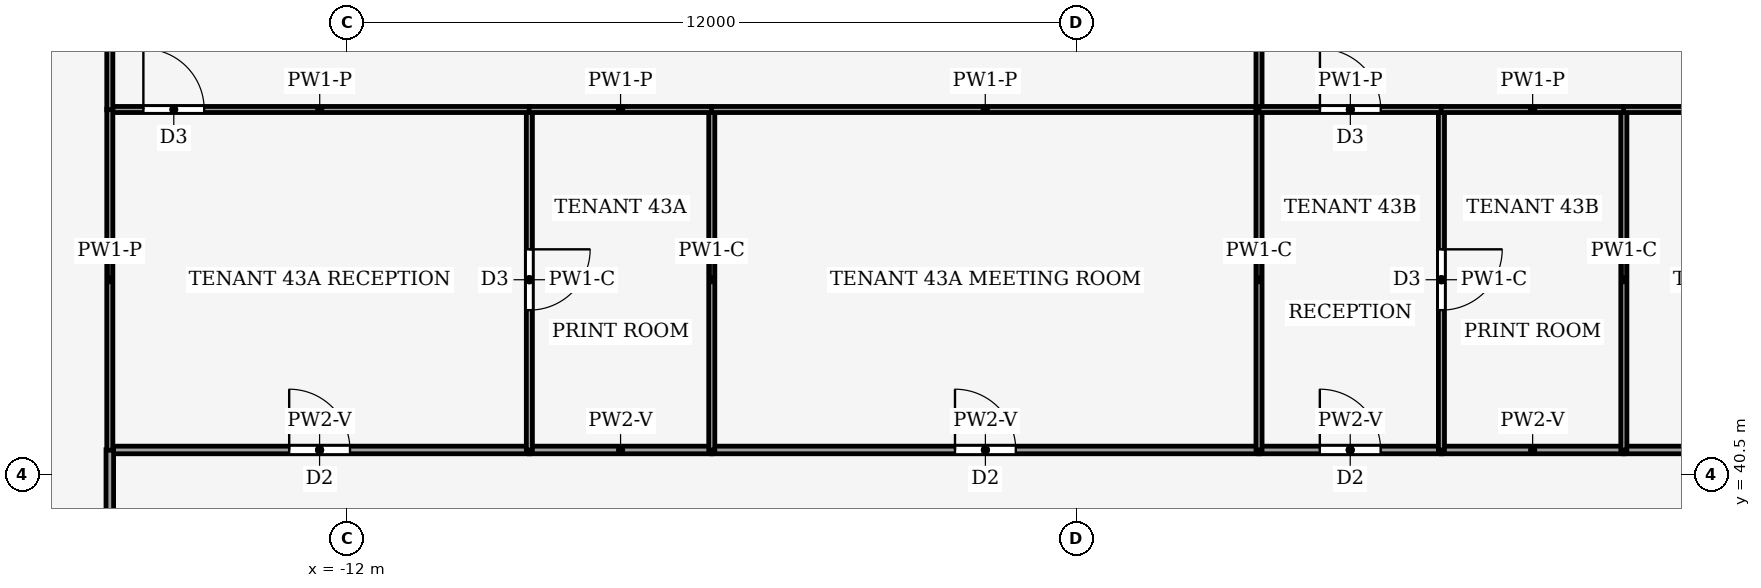
"""IFC4 building model, lengths in metres.
Left out: names, types, materials, properties, quantities, classifications, styles, units other than length and angle.
Written with IfcOpenShell. Run it as: python <this file> out.ifc"""

import sys

from ifc_helpers import new_model, si_unit, direction, frame, frame_2d, origin, place, context, subcontext, project, spatial, rectangle, extrude, element, fill, save


model = new_model("IFC4")
c1 = context("Model", 3, precision=1e-05, world=origin(), true_north=direction((0.0, 1.0)))
c2 = subcontext(c1, "Body", "Model", "MODEL_VIEW")
j1 = project(units=[si_unit("LENGTHUNIT", "METRE"), si_unit("PLANEANGLEUNIT", "RADIAN")], contexts=[c1])
p1 = place(None, origin())
s1 = spatial("IfcSite", under=j1, at=p1, CompositionType="ELEMENT")
p2 = place(p1, origin())
s2 = spatial("IfcBuilding", under=s1, at=p2, CompositionType="ELEMENT")
p3 = place(p2, frame((0.0, 0.0, 190.0)))
s3 = spatial("IfcBuildingStorey", under=s2, at=p3, CompositionType="ELEMENT", Elevation=190.0)
p4 = place(p3, frame((-15.9, 40.9, 0.0), z_axis=(0.0, 0.0, 1.0), x_axis=(1.0, 0.0, 0.0)))
e1 = element("IfcWall", 1, at=p4, inside=s3, PredefinedType="PARTITIONING", context=c2, shape_type="SweptSolid", body=[
    extrude(rectangle(XDim=6.9, YDim=0.125, at=frame_2d((3.45, 0.0))), origin(), (0.0, 0.0, 1.0), 3.44),
])
p5 = place(p4, frame((2.95, 0.0, 0.0)))
e2 = element("IfcOpeningElement", 2, at=p5, cuts=e1, PredefinedType="OPENING", context=c2, shape_type="SweptSolid", body=[
    extrude(rectangle(XDim=1.0, YDim=2.1, at=frame_2d((0.5, 1.05))), frame((0.0, 0.073, 0.0), z_axis=(0.0, -1.0, 0.0), x_axis=(1.0, 0.0, 0.0)), (0.0, 0.0, 1.0), 0.145),
])
p6 = place(p3, frame((-6.0, 40.9, 0.0), z_axis=(0.0, 0.0, 1.0), x_axis=(-1.0, 0.0, 0.0)))
e3 = element("IfcWall", 3, at=p6, inside=s3, PredefinedType="PARTITIONING", context=c2, shape_type="SweptSolid", body=[
    extrude(rectangle(XDim=3.0, YDim=0.125, at=frame_2d((1.5, 0.0))), origin(), (0.0, 0.0, 1.0), 3.44),
])
p7 = place(p3, frame((-6.0, 40.9, 0.0), z_axis=(0.0, 0.0, 1.0), x_axis=(1.0, 0.0, 0.0)))
e4 = element("IfcWall", 4, at=p7, inside=s3, PredefinedType="PARTITIONING", context=c2, shape_type="SweptSolid", body=[
    extrude(rectangle(XDim=9.0, YDim=0.125, at=frame_2d((4.5, 0.0))), origin(), (0.0, 0.0, 1.0), 3.44),
])
p8 = place(p7, frame((4.0, 0.0, 0.0)))
e5 = element("IfcOpeningElement", 5, at=p8, cuts=e4, PredefinedType="OPENING", context=c2, shape_type="SweptSolid", body=[
    extrude(rectangle(XDim=1.0, YDim=2.1, at=frame_2d((0.5, 1.05))), frame((0.0, 0.073, 0.0), z_axis=(0.0, -1.0, 0.0), x_axis=(1.0, 0.0, 0.0)), (0.0, 0.0, 1.0), 0.145),
])
p9 = place(p3, frame((3.0, 40.9, 0.0), z_axis=(0.0, 0.0, 1.0), x_axis=(1.0, 0.0, 0.0)))
e6 = element("IfcWall", 6, at=p9, inside=s3, PredefinedType="PARTITIONING", context=c2, shape_type="SweptSolid", body=[
    extrude(rectangle(XDim=3.0, YDim=0.125, at=frame_2d((1.5, 0.0))), origin(), (0.0, 0.0, 1.0), 3.44),
])
p10 = place(p9, frame((1.0, 0.0, 0.0)))
e7 = element("IfcOpeningElement", 7, at=p10, cuts=e6, PredefinedType="OPENING", context=c2, shape_type="SweptSolid", body=[
    extrude(rectangle(XDim=1.0, YDim=2.1, at=frame_2d((0.5, 1.05))), frame((0.0, 0.073, 0.0), z_axis=(0.0, -1.0, 0.0), x_axis=(1.0, 0.0, 0.0)), (0.0, 0.0, 1.0), 0.145),
])
p11 = place(p3, frame((9.0, 40.9, 0.0), z_axis=(0.0, 0.0, 1.0), x_axis=(-1.0, 0.0, 0.0)))
e8 = element("IfcWall", 8, at=p11, inside=s3, PredefinedType="PARTITIONING", context=c2, shape_type="SweptSolid", body=[
    extrude(rectangle(XDim=3.0, YDim=0.125, at=frame_2d((1.5, 0.0))), origin(), (0.0, 0.0, 1.0), 3.44),
])
p12 = place(p3, frame((9.0, 40.9, 0.0), z_axis=(0.0, 0.0, 1.0), x_axis=(1.0, 0.0, 0.0)))
e9 = element("IfcWall", 9, at=p12, inside=s3, PredefinedType="PARTITIONING", context=c2, shape_type="SweptSolid", body=[
    extrude(rectangle(XDim=6.9, YDim=0.125, at=frame_2d((3.45, 0.0))), origin(), (0.0, 0.0, 1.0), 3.44),
])
p13 = place(p12, frame((2.95, 0.0, 0.0)))
e10 = element("IfcOpeningElement", 10, at=p13, cuts=e9, PredefinedType="OPENING", context=c2, shape_type="SweptSolid", body=[
    extrude(rectangle(XDim=1.0, YDim=2.1, at=frame_2d((0.5, 1.05))), frame((0.0, 0.073, 0.0), z_axis=(0.0, -1.0, 0.0), x_axis=(1.0, 0.0, 0.0)), (0.0, 0.0, 1.0), 0.145),
])
p14 = place(p3, frame((-15.9, 34.5, 0.0), z_axis=(0.0, 0.0, 1.0), x_axis=(0.0, 1.0, 0.0)))
e11 = element("IfcWall", 11, at=p14, inside=s3, PredefinedType="PARTITIONING", context=c2, shape_type="SweptSolid", body=[
    extrude(rectangle(XDim=6.404, YDim=0.125, at=frame_2d((3.202, 0.0))), origin(), (0.0, 0.0, 1.0), 3.14),
])
p15 = place(p14, frame((2.702, 0.0, 0.0)))
e12 = element("IfcOpeningElement", 12, at=p15, cuts=e11, PredefinedType="OPENING", context=c2, shape_type="SweptSolid", body=[
    extrude(rectangle(XDim=1.0, YDim=2.1, at=frame_2d((0.5, 1.05))), frame((0.0, 0.073, 0.0), z_axis=(0.0, -1.0, 0.0), x_axis=(1.0, 0.0, 0.0)), (0.0, 0.0, 1.0), 0.145),
])
p16 = place(p3, frame((-9.0, 46.5, 0.0), z_axis=(0.0, 0.0, 1.0), x_axis=(0.0, -1.0, 0.0)))
e13 = element("IfcWall", 13, at=p16, inside=s3, PredefinedType="PARTITIONING", context=c2, shape_type="SweptSolid", body=[
    extrude(rectangle(XDim=5.6, YDim=0.1, at=frame_2d((2.8, 0.0))), origin(), (0.0, 0.0, 1.0), 3.87),
])
p17 = place(p16, frame((2.3, 0.0, 0.0)))
e14 = element("IfcOpeningElement", 14, at=p17, cuts=e13, PredefinedType="OPENING", context=c2, shape_type="SweptSolid", body=[
    extrude(rectangle(XDim=1.0, YDim=2.1, at=frame_2d((0.5, 1.05))), frame((0.0, 0.06, 0.0), z_axis=(0.0, -1.0, 0.0), x_axis=(1.0, 0.0, 0.0)), (0.0, 0.0, 1.0), 0.12),
])
p18 = place(p3, frame((-15.9, 46.5, 0.0), z_axis=(0.0, 0.0, 1.0), x_axis=(1.0, 0.0, 0.0)))
e15 = element("IfcWall", 15, at=p18, inside=s3, PredefinedType="PARTITIONING", context=c2, shape_type="SweptSolid", body=[
    extrude(rectangle(XDim=6.904, YDim=0.1, at=frame_2d((3.452, 0.0))), origin(), (0.0, 0.0, 1.0), 3.44),
])
p19 = place(p18, frame((0.552, 0.0, 0.0)))
e16 = element("IfcOpeningElement", 16, at=p19, cuts=e15, PredefinedType="OPENING", context=c2, shape_type="SweptSolid", body=[
    extrude(rectangle(XDim=1.0, YDim=2.1, at=frame_2d((0.5, 1.05))), frame((0.0, 0.06, 0.0), z_axis=(0.0, -1.0, 0.0), x_axis=(1.0, 0.0, 0.0)), (0.0, 0.0, 1.0), 0.12),
])
p20 = place(p3, frame((-15.9, 46.504, 0.0), z_axis=(0.0, 0.0, 1.0), x_axis=(0.0, -1.0, 0.0)))
e17 = element("IfcWall", 17, at=p20, inside=s3, PredefinedType="PARTITIONING", context=c2, shape_type="SweptSolid", body=[
    extrude(rectangle(XDim=5.608, YDim=0.1, at=frame_2d((2.804, 0.0))), origin(), (0.0, 0.0, 1.0), 3.44),
])
p21 = place(p3, frame((-6.0, 40.9, 0.0), z_axis=(0.0, 0.0, 1.0), x_axis=(0.0, 1.0, 0.0)))
e18 = element("IfcWall", 18, at=p21, inside=s3, PredefinedType="PARTITIONING", context=c2, shape_type="SweptSolid", body=[
    extrude(rectangle(XDim=5.6, YDim=0.1, at=frame_2d((2.8, 0.0))), origin(), (0.0, 0.0, 1.0), 3.87),
])
p22 = place(p3, frame((-5.996, 46.5, 0.0), z_axis=(0.0, 0.0, 1.0), x_axis=(-1.0, 0.0, 0.0)))
e19 = element("IfcWall", 19, at=p22, inside=s3, PredefinedType="PARTITIONING", context=c2, shape_type="SweptSolid", body=[
    extrude(rectangle(XDim=3.008, YDim=0.1, at=frame_2d((1.504, 0.0))), origin(), (0.0, 0.0, 1.0), 3.44),
])
p23 = place(p3, frame((3.0, 46.5, 0.0), z_axis=(0.0, 0.0, 1.0), x_axis=(-1.0, 0.0, 0.0)))
e20 = element("IfcWall", 20, at=p23, inside=s3, PredefinedType="PARTITIONING", context=c2, shape_type="SweptSolid", body=[
    extrude(rectangle(XDim=9.004, YDim=0.1, at=frame_2d((4.502, 0.0))), origin(), (0.0, 0.0, 1.0), 3.44),
])
p24 = place(p3, frame((3.0, 40.9, 0.0), z_axis=(0.0, 0.0, 1.0), x_axis=(0.0, 1.0, 0.0)))
e21 = element("IfcWall", 21, at=p24, inside=s3, PredefinedType="PARTITIONING", context=c2, shape_type="SweptSolid", body=[
    extrude(rectangle(XDim=5.6, YDim=0.1, at=frame_2d((2.8, 0.0))), origin(), (0.0, 0.0, 1.0), 3.87),
])
p25 = place(p3, frame((3.0, 46.5, 0.0), z_axis=(0.0, 0.0, 1.0), x_axis=(0.0, 1.0, 0.0)))
e22 = element("IfcWall", 22, at=p25, inside=s3, PredefinedType="PARTITIONING", context=c2, shape_type="SweptSolid", body=[
    extrude(rectangle(XDim=15.0, YDim=0.1, at=frame_2d((7.5, 0.0))), origin(), (0.0, 0.0, 1.0), 3.24),
])
p26 = place(p3, frame((-15.9, 61.504, 0.0), z_axis=(0.0, 0.0, 1.0), x_axis=(0.0, -1.0, 0.0)))
e23 = element("IfcWall", 23, at=p26, inside=s3, PredefinedType="PARTITIONING", context=c2, shape_type="SweptSolid", body=[
    extrude(rectangle(XDim=15.008, YDim=0.1, at=frame_2d((7.504, 0.0))), origin(), (0.0, 0.0, 1.0), 3.24),
])
p27 = place(p3, frame((6.0, 46.5, 0.0), z_axis=(0.0, 0.0, 1.0), x_axis=(0.0, -1.0, 0.0)))
e24 = element("IfcWall", 24, at=p27, inside=s3, PredefinedType="PARTITIONING", context=c2, shape_type="SweptSolid", body=[
    extrude(rectangle(XDim=5.6, YDim=0.1, at=frame_2d((2.8, 0.0))), origin(), (0.0, 0.0, 1.0), 3.87),
])
p28 = place(p27, frame((2.3, 0.0, 0.0)))
e25 = element("IfcOpeningElement", 25, at=p28, cuts=e24, PredefinedType="OPENING", context=c2, shape_type="SweptSolid", body=[
    extrude(rectangle(XDim=1.0, YDim=2.1, at=frame_2d((0.5, 1.05))), frame((0.0, 0.06, 0.0), z_axis=(0.0, -1.0, 0.0), x_axis=(1.0, 0.0, 0.0)), (0.0, 0.0, 1.0), 0.12),
])
p29 = place(p3, frame((3.0, 46.5, 0.0), z_axis=(0.0, 0.0, 1.0), x_axis=(1.0, 0.0, 0.0)))
e26 = element("IfcWall", 26, at=p29, inside=s3, PredefinedType="PARTITIONING", context=c2, shape_type="SweptSolid", body=[
    extrude(rectangle(XDim=3.004, YDim=0.1, at=frame_2d((1.502, 0.0))), origin(), (0.0, 0.0, 1.0), 3.44),
])
p30 = place(p29, frame((1.002, 0.0, 0.0)))
e27 = element("IfcOpeningElement", 27, at=p30, cuts=e26, PredefinedType="OPENING", context=c2, shape_type="SweptSolid", body=[
    extrude(rectangle(XDim=1.0, YDim=2.1, at=frame_2d((0.5, 1.05))), frame((0.0, 0.06, 0.0), z_axis=(0.0, -1.0, 0.0), x_axis=(1.0, 0.0, 0.0)), (0.0, 0.0, 1.0), 0.12),
])
p31 = place(p3, frame((9.0, 40.9, 0.0), z_axis=(0.0, 0.0, 1.0), x_axis=(0.0, 1.0, 0.0)))
e28 = element("IfcWall", 28, at=p31, inside=s3, PredefinedType="PARTITIONING", context=c2, shape_type="SweptSolid", body=[
    extrude(rectangle(XDim=5.6, YDim=0.1, at=frame_2d((2.8, 0.0))), origin(), (0.0, 0.0, 1.0), 3.87),
])
p32 = place(p3, frame((9.004, 46.5, 0.0), z_axis=(0.0, 0.0, 1.0), x_axis=(-1.0, 0.0, 0.0)))
e29 = element("IfcWall", 29, at=p32, inside=s3, PredefinedType="PARTITIONING", context=c2, shape_type="SweptSolid", body=[
    extrude(rectangle(XDim=3.008, YDim=0.1, at=frame_2d((1.504, 0.0))), origin(), (0.0, 0.0, 1.0), 3.44),
])
p33 = place(p3, frame((15.9, 46.5, 0.0), z_axis=(0.0, 0.0, 1.0), x_axis=(-1.0, 0.0, 0.0)))
e30 = element("IfcWall", 30, at=p33, inside=s3, PredefinedType="PARTITIONING", context=c2, shape_type="SweptSolid", body=[
    extrude(rectangle(XDim=6.904, YDim=0.1, at=frame_2d((3.452, 0.0))), origin(), (0.0, 0.0, 1.0), 3.44),
])
p34 = place(p5, origin())
e31 = element("IfcDoor", 31, at=p34, inside=s3, OperationType="SINGLE_SWING_LEFT", PredefinedType="DOOR", context=c2, shape_type="SweptSolid", body=[
    extrude(rectangle(XDim=1.0, YDim=2.1, at=frame_2d((0.5, 1.05))), frame((0.0, 0.025, 0.0), z_axis=(0.0, -1.0, 0.0), x_axis=(1.0, 0.0, 0.0)), (0.0, 0.0, 1.0), 0.05),
])
fill(e2, e31)
p35 = place(p8, origin())
e32 = element("IfcDoor", 32, at=p35, inside=s3, OperationType="SINGLE_SWING_RIGHT", PredefinedType="DOOR", context=c2, shape_type="SweptSolid", body=[
    extrude(rectangle(XDim=1.0, YDim=2.1, at=frame_2d((0.5, 1.05))), frame((0.0, 0.025, 0.0), z_axis=(0.0, -1.0, 0.0), x_axis=(1.0, 0.0, 0.0)), (0.0, 0.0, 1.0), 0.05),
])
fill(e5, e32)
p36 = place(p10, origin())
e33 = element("IfcDoor", 33, at=p36, inside=s3, OperationType="SINGLE_SWING_LEFT", PredefinedType="DOOR", context=c2, shape_type="SweptSolid", body=[
    extrude(rectangle(XDim=1.0, YDim=2.1, at=frame_2d((0.5, 1.05))), frame((0.0, 0.025, 0.0), z_axis=(0.0, -1.0, 0.0), x_axis=(1.0, 0.0, 0.0)), (0.0, 0.0, 1.0), 0.05),
])
fill(e7, e33)
p37 = place(p17, origin())
e34 = element("IfcDoor", 34, at=p37, inside=s3, OperationType="SINGLE_SWING_RIGHT", PredefinedType="DOOR", context=c2, shape_type="SweptSolid", body=[
    extrude(rectangle(XDim=1.0, YDim=2.1, at=frame_2d((0.5, 1.05))), frame((0.0, 0.025, 0.0), z_axis=(0.0, -1.0, 0.0), x_axis=(1.0, 0.0, 0.0)), (0.0, 0.0, 1.0), 0.05),
])
fill(e14, e34)
p38 = place(p19, origin())
e35 = element("IfcDoor", 35, at=p38, inside=s3, OperationType="SINGLE_SWING_LEFT", PredefinedType="DOOR", context=c2, shape_type="SweptSolid", body=[
    extrude(rectangle(XDim=1.0, YDim=2.1, at=frame_2d((0.5, 1.05))), frame((0.0, 0.025, 0.0), z_axis=(0.0, -1.0, 0.0), x_axis=(1.0, 0.0, 0.0)), (0.0, 0.0, 1.0), 0.05),
])
fill(e16, e35)
p39 = place(p28, origin())
e36 = element("IfcDoor", 36, at=p39, inside=s3, OperationType="SINGLE_SWING_RIGHT", PredefinedType="DOOR", context=c2, shape_type="SweptSolid", body=[
    extrude(rectangle(XDim=1.0, YDim=2.1, at=frame_2d((0.5, 1.05))), frame((0.0, 0.025, 0.0), z_axis=(0.0, -1.0, 0.0), x_axis=(1.0, 0.0, 0.0)), (0.0, 0.0, 1.0), 0.05),
])
fill(e25, e36)
p40 = place(p30, origin())
e37 = element("IfcDoor", 37, at=p40, inside=s3, OperationType="SINGLE_SWING_LEFT", PredefinedType="DOOR", context=c2, shape_type="SweptSolid", body=[
    extrude(rectangle(XDim=1.0, YDim=2.1, at=frame_2d((0.5, 1.05))), frame((0.0, 0.025, 0.0), z_axis=(0.0, -1.0, 0.0), x_axis=(1.0, 0.0, 0.0)), (0.0, 0.0, 1.0), 0.05),
])
fill(e27, e37)
save(model, sys.argv[1])
